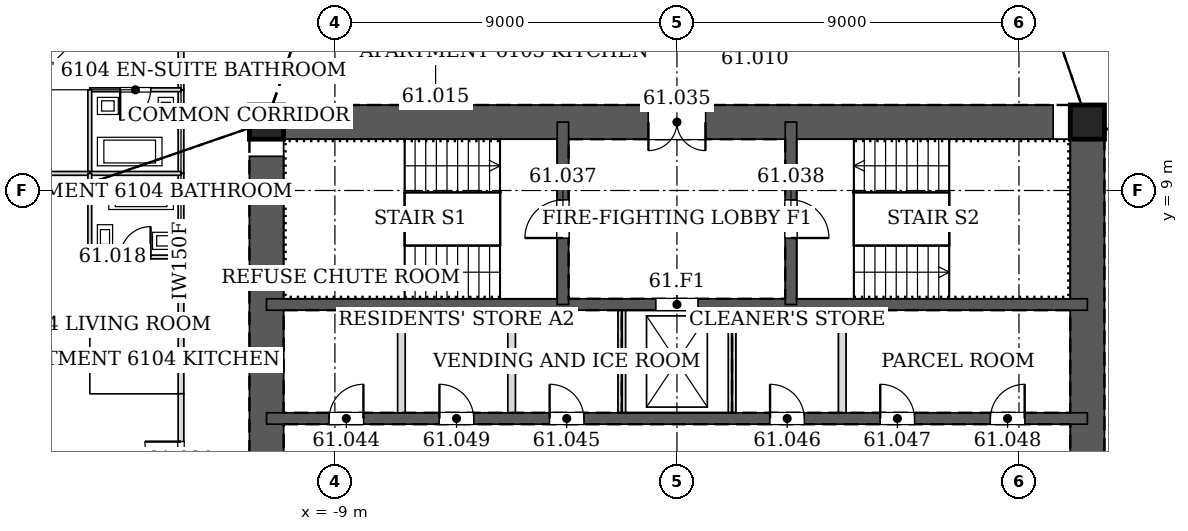
"""IFC4 building model, lengths in metres.
Left out: names, types, materials, properties, quantities, classifications, styles, units other than length and angle.
Written with IfcOpenShell. Run it as: python <this file> out.ifc"""

import sys

from ifc_helpers import new_model, si_unit, direction, frame, frame_2d, origin, origin_2d, place, context, subcontext, project, spatial, rectangle, hollow_rectangle, extrude, element, fill, save


model = new_model("IFC4")
c1 = context("Model", 3, precision=1e-05, world=origin(), true_north=direction((0.0, 1.0)))
c2 = subcontext(c1, "Body", "Model", "MODEL_VIEW")
j1 = project(units=[si_unit("LENGTHUNIT", "METRE"), si_unit("PLANEANGLEUNIT", "RADIAN")], contexts=[c1])
p1 = place(None, origin())
s1 = spatial("IfcSite", under=j1, at=p1, CompositionType="ELEMENT")
p2 = place(p1, origin())
s2 = spatial("IfcBuilding", under=s1, at=p2, CompositionType="ELEMENT")
p3 = place(p2, frame((0.0, 0.0, 255.0)))
s3 = spatial("IfcBuildingStorey", under=s2, at=p3, CompositionType="ELEMENT", Elevation=255.0)
for number, where, z_axis, x_axis in (
    (1, (10.8, 10.8, 0.0), (0.0, 0.0, 1.0), (1.0, 0.0, 0.0)),
    (2, (-10.8, 10.8, 0.0), (0.0, 0.0, 1.0), (1.0, 0.0, 0.0)),
):
    element("IfcColumn", number, at=place(p3, frame(where, z_axis=z_axis, x_axis=x_axis)), inside=s3, PredefinedType="COLUMN", context=c2, shape_type="SweptSolid", body=[
        extrude(hollow_rectangle(XDim=0.9, YDim=0.9, WallThickness=0.04, at=origin_2d()), origin(), (0.0, 0.0, 1.0), 3.4),
    ])
p4 = place(p3, frame((10.8, -10.8, 0.0), z_axis=(0.0, 0.0, 1.0), x_axis=(0.0, 1.0, 0.0)))
e3 = element("IfcWall", 3, at=p4, inside=s3, PredefinedType="SOLIDWALL", context=c2, shape_type="SweptSolid", body=[
    extrude(rectangle(XDim=21.6, YDim=0.9, at=frame_2d((10.8, 0.0))), origin(), (0.0, 0.0, 1.0), 3.4),
])
p5 = place(p4, frame((11.7, 0.0, 0.0)))
e4 = element("IfcOpeningElement", 4, at=p5, cuts=e3, PredefinedType="OPENING", context=c2, shape_type="SweptSolid", body=[
    extrude(rectangle(XDim=1.2, YDim=2.1, at=frame_2d((0.6, 1.05))), frame((0.0, 0.46, 0.0), z_axis=(0.0, -1.0, 0.0), x_axis=(1.0, 0.0, 0.0)), (0.0, 0.0, 1.0), 0.92),
])
p6 = place(p4, frame((8.7, 0.0, 0.0)))
e5 = element("IfcOpeningElement", 5, at=p6, cuts=e3, PredefinedType="OPENING", context=c2, shape_type="SweptSolid", body=[
    extrude(rectangle(XDim=1.2, YDim=2.1, at=frame_2d((0.6, 1.05))), frame((0.0, 0.46, 0.0), z_axis=(0.0, -1.0, 0.0), x_axis=(1.0, 0.0, 0.0)), (0.0, 0.0, 1.0), 0.92),
])
p7 = place(p3, frame((10.8, 10.8, 0.0), z_axis=(0.0, 0.0, 1.0), x_axis=(-1.0, 0.0, 0.0)))
e6 = element("IfcWall", 6, at=p7, inside=s3, PredefinedType="SOLIDWALL", context=c2, shape_type="SweptSolid", body=[
    extrude(rectangle(XDim=21.6, YDim=0.9, at=frame_2d((10.8, 0.0))), origin(), (0.0, 0.0, 1.0), 3.4),
])
p8 = place(p7, frame((10.05, 0.0, 0.0)))
e7 = element("IfcOpeningElement", 7, at=p8, cuts=e6, PredefinedType="OPENING", context=c2, shape_type="SweptSolid", body=[
    extrude(rectangle(XDim=1.5, YDim=2.1, at=frame_2d((0.75, 1.05))), frame((0.0, 0.46, 0.0), z_axis=(0.0, -1.0, 0.0), x_axis=(1.0, 0.0, 0.0)), (0.0, 0.0, 1.0), 0.92),
])
p9 = place(p3, frame((-10.8, 10.8, 0.0), z_axis=(0.0, 0.0, 1.0), x_axis=(0.0, -1.0, 0.0)))
e8 = element("IfcWall", 8, at=p9, inside=s3, PredefinedType="SOLIDWALL", context=c2, shape_type="SweptSolid", body=[
    extrude(rectangle(XDim=21.6, YDim=0.9, at=frame_2d((10.8, 0.0))), origin(), (0.0, 0.0, 1.0), 3.4),
])
p10 = place(p9, frame((8.7, 0.0, 0.0)))
e9 = element("IfcOpeningElement", 9, at=p10, cuts=e8, PredefinedType="OPENING", context=c2, shape_type="SweptSolid", body=[
    extrude(rectangle(XDim=1.2, YDim=2.1, at=frame_2d((0.6, 1.05))), frame((0.0, 0.46, 0.0), z_axis=(0.0, -1.0, 0.0), x_axis=(1.0, 0.0, 0.0)), (0.0, 0.0, 1.0), 0.92),
])
p11 = place(p9, frame((11.7, 0.0, 0.0)))
e10 = element("IfcOpeningElement", 10, at=p11, cuts=e8, PredefinedType="OPENING", context=c2, shape_type="SweptSolid", body=[
    extrude(rectangle(XDim=1.2, YDim=2.1, at=frame_2d((0.6, 1.05))), frame((0.0, 0.46, 0.0), z_axis=(0.0, -1.0, 0.0), x_axis=(1.0, 0.0, 0.0)), (0.0, 0.0, 1.0), 0.92),
])
p12 = place(p3, frame((-10.8, 3.0, 0.0), z_axis=(0.0, 0.0, 1.0), x_axis=(1.0, 0.0, 0.0)))
e11 = element("IfcWall", 11, at=p12, inside=s3, PredefinedType="SOLIDWALL", context=c2, shape_type="SweptSolid", body=[
    extrude(rectangle(XDim=21.6, YDim=0.3, at=frame_2d((10.8, 0.0))), origin(), (0.0, 0.0, 1.0), 3.4),
])
p13 = place(p12, frame((1.65, 0.0, 0.0)))
e12 = element("IfcOpeningElement", 12, at=p13, cuts=e11, PredefinedType="OPENING", context=c2, shape_type="SweptSolid", body=[
    extrude(rectangle(XDim=0.9, YDim=2.1, at=frame_2d((0.45, 1.05))), frame((0.0, 0.16, 0.0), z_axis=(0.0, -1.0, 0.0), x_axis=(1.0, 0.0, 0.0)), (0.0, 0.0, 1.0), 0.32),
])
p14 = place(p12, frame((7.45, 0.0, 0.0)))
e13 = element("IfcOpeningElement", 13, at=p14, cuts=e11, PredefinedType="OPENING", context=c2, shape_type="SweptSolid", body=[
    extrude(rectangle(XDim=0.9, YDim=2.1, at=frame_2d((0.45, 1.05))), frame((0.0, 0.16, 0.0), z_axis=(0.0, -1.0, 0.0), x_axis=(1.0, 0.0, 0.0)), (0.0, 0.0, 1.0), 0.32),
])
p15 = place(p12, frame((13.25, 0.0, 0.0)))
e14 = element("IfcOpeningElement", 14, at=p15, cuts=e11, PredefinedType="OPENING", context=c2, shape_type="SweptSolid", body=[
    extrude(rectangle(XDim=0.9, YDim=2.1, at=frame_2d((0.45, 1.05))), frame((0.0, 0.16, 0.0), z_axis=(0.0, -1.0, 0.0), x_axis=(1.0, 0.0, 0.0)), (0.0, 0.0, 1.0), 0.32),
])
p16 = place(p12, frame((16.15, 0.0, 0.0)))
e15 = element("IfcOpeningElement", 15, at=p16, cuts=e11, PredefinedType="OPENING", context=c2, shape_type="SweptSolid", body=[
    extrude(rectangle(XDim=0.9, YDim=2.1, at=frame_2d((0.45, 1.05))), frame((0.0, 0.16, 0.0), z_axis=(0.0, -1.0, 0.0), x_axis=(1.0, 0.0, 0.0)), (0.0, 0.0, 1.0), 0.32),
])
p17 = place(p12, frame((19.05, 0.0, 0.0)))
e16 = element("IfcOpeningElement", 16, at=p17, cuts=e11, PredefinedType="OPENING", context=c2, shape_type="SweptSolid", body=[
    extrude(rectangle(XDim=0.9, YDim=2.1, at=frame_2d((0.45, 1.05))), frame((0.0, 0.16, 0.0), z_axis=(0.0, -1.0, 0.0), x_axis=(1.0, 0.0, 0.0)), (0.0, 0.0, 1.0), 0.32),
])
p18 = place(p12, frame((4.55, 0.0, 0.0)))
e17 = element("IfcOpeningElement", 17, at=p18, cuts=e11, PredefinedType="OPENING", context=c2, shape_type="SweptSolid", body=[
    extrude(rectangle(XDim=0.9, YDim=2.1, at=frame_2d((0.45, 1.05))), frame((0.0, 0.16, 0.0), z_axis=(0.0, -1.0, 0.0), x_axis=(1.0, 0.0, 0.0)), (0.0, 0.0, 1.0), 0.32),
])
p19 = place(p3, frame((-10.8, 6.0, 0.0), z_axis=(0.0, 0.0, 1.0), x_axis=(1.0, 0.0, 0.0)))
e18 = element("IfcWall", 18, at=p19, inside=s3, PredefinedType="SOLIDWALL", context=c2, shape_type="SweptSolid", body=[
    extrude(rectangle(XDim=21.6, YDim=0.3, at=frame_2d((10.8, 0.0))), origin(), (0.0, 0.0, 1.0), 3.4),
])
p20 = place(p19, frame((10.25, 0.0, 0.0)))
e19 = element("IfcOpeningElement", 19, at=p20, cuts=e18, PredefinedType="OPENING", context=c2, shape_type="SweptSolid", body=[
    extrude(rectangle(XDim=1.1, YDim=2.1, at=frame_2d((0.55, 1.05))), frame((0.0, 0.16, 0.0), z_axis=(0.0, -1.0, 0.0), x_axis=(1.0, 0.0, 0.0)), (0.0, 0.0, 1.0), 0.32),
])
p21 = place(p3, frame((-3.0, 6.0, 0.0), z_axis=(0.0, 0.0, 1.0), x_axis=(0.0, 1.0, 0.0)))
e20 = element("IfcWall", 20, at=p21, inside=s3, PredefinedType="SOLIDWALL", context=c2, shape_type="SweptSolid", body=[
    extrude(rectangle(XDim=4.8, YDim=0.3, at=frame_2d((2.4, 0.0))), origin(), (0.0, 0.0, 1.0), 3.4),
])
p22 = place(p21, frame((1.75, 0.0, 0.0)))
e21 = element("IfcOpeningElement", 21, at=p22, cuts=e20, PredefinedType="OPENING", context=c2, shape_type="SweptSolid", body=[
    extrude(rectangle(XDim=1.0, YDim=2.1, at=frame_2d((0.5, 1.05))), frame((0.0, 0.16, 0.0), z_axis=(0.0, -1.0, 0.0), x_axis=(1.0, 0.0, 0.0)), (0.0, 0.0, 1.0), 0.32),
])
p23 = place(p3, frame((3.0, 6.0, 0.0), z_axis=(0.0, 0.0, 1.0), x_axis=(0.0, 1.0, 0.0)))
e22 = element("IfcWall", 22, at=p23, inside=s3, PredefinedType="SOLIDWALL", context=c2, shape_type="SweptSolid", body=[
    extrude(rectangle(XDim=4.8, YDim=0.3, at=frame_2d((2.4, 0.0))), origin(), (0.0, 0.0, 1.0), 3.4),
])
p24 = place(p23, frame((1.75, 0.0, 0.0)))
e23 = element("IfcOpeningElement", 23, at=p24, cuts=e22, PredefinedType="OPENING", context=c2, shape_type="SweptSolid", body=[
    extrude(rectangle(XDim=1.0, YDim=2.1, at=frame_2d((0.5, 1.05))), frame((0.0, 0.16, 0.0), z_axis=(0.0, -1.0, 0.0), x_axis=(1.0, 0.0, 0.0)), (0.0, 0.0, 1.0), 0.32),
])
p25 = place(p3, frame((-13.05, 11.651, 0.0), z_axis=(0.0, 0.0, 1.0), x_axis=(0.0, -1.0, 0.0)))
e24 = element("IfcWall", 24, at=p25, inside=s3, PredefinedType="PARTITIONING", context=c2, shape_type="SweptSolid", body=[
    extrude(rectangle(XDim=2.202, YDim=0.15, at=frame_2d((1.101, 0.0))), origin(), (0.0, 0.0, 1.0), 2.349),
])
p26 = place(p3, frame((-13.05, 13.05, 0.0), z_axis=(0.0, 0.0, 1.0), x_axis=(0.0, -1.0, 0.0)))
e25 = element("IfcWall", 25, at=p26, inside=s3, PredefinedType="PARTITIONING", context=c2, shape_type="SweptSolid", body=[
    extrude(rectangle(XDim=1.401, YDim=0.15, at=frame_2d((0.701, 0.0))), origin(), (0.0, 0.0, 1.0), 2.656),
])
p27 = place(p3, frame((-13.05, 9.451, 0.0), z_axis=(0.0, 0.0, 1.0), x_axis=(0.0, -1.0, 0.0)))
e26 = element("IfcWall", 26, at=p27, inside=s3, PredefinedType="PARTITIONING", context=c2, shape_type="SweptSolid", body=[
    extrude(rectangle(XDim=2.202, YDim=0.15, at=frame_2d((1.101, 0.0))), origin(), (0.0, 0.0, 1.0), 2.662),
])
p28 = place(p3, frame((-13.05, 5.451, 0.0), z_axis=(0.0, 0.0, 1.0), x_axis=(0.0, -1.0, 0.0)))
e27 = element("IfcWall", 27, at=p28, inside=s3, PredefinedType="PARTITIONING", context=c2, shape_type="SweptSolid", body=[
    extrude(rectangle(XDim=1.802, YDim=0.15, at=frame_2d((0.901, 0.0))), origin(), (0.0, 0.0, 1.0), 2.662),
])
p29 = place(p3, frame((-13.05, 3.651, 0.0), z_axis=(0.0, 0.0, 1.0), x_axis=(0.0, -1.0, 0.0)))
e28 = element("IfcWall", 28, at=p29, inside=s3, PredefinedType="PARTITIONING", context=c2, shape_type="SweptSolid", body=[
    extrude(rectangle(XDim=3.469, YDim=0.15, at=frame_2d((1.734, 0.0))), origin(), (0.0, 0.0, 1.0), 2.662),
])
p30 = place(p29, frame((1.259, 0.0, 0.0)))
e29 = element("IfcOpeningElement", 29, at=p30, cuts=e28, PredefinedType="OPENING", context=c2, shape_type="SweptSolid", body=[
    extrude(rectangle(XDim=0.95, YDim=2.1, at=frame_2d((0.475, 1.05))), frame((0.0, 0.085, 0.0), z_axis=(0.0, -1.0, 0.0), x_axis=(1.0, 0.0, 0.0)), (0.0, 0.0, 1.0), 0.17),
])
p31 = place(p3, frame((-13.05, 7.251, 0.0), z_axis=(0.0, 0.0, 1.0), x_axis=(0.0, -1.0, 0.0)))
e30 = element("IfcWall", 30, at=p31, inside=s3, PredefinedType="PARTITIONING", context=c2, shape_type="SweptSolid", body=[
    extrude(rectangle(XDim=1.802, YDim=0.15, at=frame_2d((0.901, 0.0))), origin(), (0.0, 0.0, 1.0), 2.662),
])
p32 = place(p3, frame((-13.05, 11.65, 0.0), z_axis=(0.0, 0.0, 1.0), x_axis=(-1.0, 0.0, 0.0)))
e31 = element("IfcWall", 31, at=p32, inside=s3, PredefinedType="PARTITIONING", context=c2, shape_type="SweptSolid", body=[
    extrude(rectangle(XDim=2.4, YDim=0.1, at=frame_2d((1.2, 0.0))), origin(), (0.0, 0.0, 1.0), 2.786),
])
p33 = place(p32, frame((0.8, 0.0, 0.0)))
e32 = element("IfcOpeningElement", 32, at=p33, cuts=e31, PredefinedType="OPENING", context=c2, shape_type="SweptSolid", body=[
    extrude(rectangle(XDim=0.8, YDim=2.1, at=frame_2d((0.4, 1.05))), frame((0.0, 0.06, 0.0), z_axis=(0.0, -1.0, 0.0), x_axis=(1.0, 0.0, 0.0)), (0.0, 0.0, 1.0), 0.12),
])
p34 = place(p3, frame((-15.45, 11.65, 0.0), z_axis=(0.0, 0.0, 1.0), x_axis=(0.0, -1.0, 0.0)))
e33 = element("IfcWall", 33, at=p34, inside=s3, PredefinedType="PARTITIONING", context=c2, shape_type="SweptSolid", body=[
    extrude(rectangle(XDim=2.2, YDim=0.1, at=frame_2d((1.1, 0.0))), origin(), (0.0, 0.0, 1.0), 2.786),
])
p35 = place(p3, frame((-15.45, 9.45, 0.0), z_axis=(0.0, 0.0, 1.0), x_axis=(1.0, 0.0, 0.0)))
e34 = element("IfcWall", 34, at=p35, inside=s3, PredefinedType="PARTITIONING", context=c2, shape_type="SweptSolid", body=[
    extrude(rectangle(XDim=2.4, YDim=0.1, at=frame_2d((1.2, 0.0))), origin(), (0.0, 0.0, 1.0), 2.349),
])
p36 = place(p3, frame((-19.945, 9.45, 0.0), z_axis=(0.0, 0.0, 1.0), x_axis=(1.0, 0.0, 0.0)))
e35 = element("IfcWall", 35, at=p36, inside=s3, PredefinedType="PARTITIONING", context=c2, shape_type="SweptSolid", body=[
    extrude(rectangle(XDim=4.495, YDim=0.1, at=frame_2d((2.248, 0.0))), origin(), (0.0, 0.0, 1.0), 2.74),
])
p37 = place(p36, frame((1.626, 0.0, 0.0)))
e36 = element("IfcOpeningElement", 36, at=p37, cuts=e35, PredefinedType="OPENING", context=c2, shape_type="SweptSolid", body=[
    extrude(rectangle(XDim=0.85, YDim=2.1, at=frame_2d((0.425, 1.05))), frame((0.0, 0.06, 0.0), z_axis=(0.0, -1.0, 0.0), x_axis=(1.0, 0.0, 0.0)), (0.0, 0.0, 1.0), 0.12),
])
p38 = place(p3, frame((-15.45, 9.45, 0.0), z_axis=(0.0, 0.0, 1.0), x_axis=(0.0, -1.0, 0.0)))
e37 = element("IfcWall", 37, at=p38, inside=s3, PredefinedType="PARTITIONING", context=c2, shape_type="SweptSolid", body=[
    extrude(rectangle(XDim=2.2, YDim=0.1, at=frame_2d((1.1, 0.0))), origin(), (0.0, 0.0, 1.0), 2.349),
])
p39 = place(p3, frame((-15.45, 7.25, 0.0), z_axis=(0.0, 0.0, 1.0), x_axis=(1.0, 0.0, 0.0)))
e38 = element("IfcWall", 38, at=p39, inside=s3, PredefinedType="PARTITIONING", context=c2, shape_type="SweptSolid", body=[
    extrude(rectangle(XDim=2.4, YDim=0.1, at=frame_2d((1.2, 0.0))), origin(), (0.0, 0.0, 1.0), 2.662),
])
p40 = place(p39, frame((0.8, 0.0, 0.0)))
e39 = element("IfcOpeningElement", 39, at=p40, cuts=e38, PredefinedType="OPENING", context=c2, shape_type="SweptSolid", body=[
    extrude(rectangle(XDim=0.8, YDim=2.1, at=frame_2d((0.4, 1.05))), frame((0.0, 0.06, 0.0), z_axis=(0.0, -1.0, 0.0), x_axis=(1.0, 0.0, 0.0)), (0.0, 0.0, 1.0), 0.12),
])
for number, where, z_axis, x_axis in (
    (40, (-7.25, 3.15, 0.0), (0.0, 0.0, 1.0), (0.0, 1.0, 0.0)),
    (41, (-4.35, 3.15, 0.0), (0.0, 0.0, 1.0), (0.0, 1.0, 0.0)),
    (42, (-1.45, 3.15, 0.0), (0.0, 0.0, 1.0), (0.0, 1.0, 0.0)),
    (43, (1.45, 3.15, 0.0), (0.0, 0.0, 1.0), (0.0, 1.0, 0.0)),
    (44, (4.35, 3.15, 0.0), (0.0, 0.0, 1.0), (0.0, 1.0, 0.0)),
):
    element("IfcWall", number, at=place(p3, frame(where, z_axis=z_axis, x_axis=x_axis)), inside=s3, PredefinedType="PARTITIONING", context=c2, shape_type="SweptSolid", body=[
        extrude(rectangle(XDim=2.7, YDim=0.2, at=frame_2d((1.35, 0.0))), origin(), (0.0, 0.0, 1.0), 3.2),
    ])
p41 = place(p33, origin())
e45 = element("IfcDoor", 45, at=p41, inside=s3, OperationType="SINGLE_SWING_RIGHT", PredefinedType="DOOR", context=c2, shape_type="SweptSolid", body=[
    extrude(rectangle(XDim=0.8, YDim=2.1, at=frame_2d((0.4, 1.05))), frame((0.0, 0.025, 0.0), z_axis=(0.0, -1.0, 0.0), x_axis=(1.0, 0.0, 0.0)), (0.0, 0.0, 1.0), 0.05),
])
fill(e32, e45)
p42 = place(p40, origin())
e46 = element("IfcDoor", 46, at=p42, inside=s3, OperationType="SINGLE_SWING_RIGHT", PredefinedType="DOOR", context=c2, shape_type="SweptSolid", body=[
    extrude(rectangle(XDim=0.8, YDim=2.1, at=frame_2d((0.4, 1.05))), frame((0.0, 0.025, 0.0), z_axis=(0.0, -1.0, 0.0), x_axis=(1.0, 0.0, 0.0)), (0.0, 0.0, 1.0), 0.05),
])
fill(e39, e46)
p43 = place(p30, frame((0.95, 0.0, 0.0), z_axis=(0.0, 0.0, 1.0), x_axis=(-1.0, 0.0, 0.0)))
e47 = element("IfcDoor", 47, at=p43, inside=s3, OperationType="SINGLE_SWING_RIGHT", PredefinedType="DOOR", context=c2, shape_type="SweptSolid", body=[
    extrude(rectangle(XDim=0.95, YDim=2.1, at=frame_2d((0.475, 1.05))), frame((0.0, 0.025, 0.0), z_axis=(0.0, -1.0, 0.0), x_axis=(1.0, 0.0, 0.0)), (0.0, 0.0, 1.0), 0.05),
])
fill(e29, e47)
p44 = place(p8, origin())
e48 = element("IfcDoor", 48, at=p44, inside=s3, OperationType="DOUBLE_DOOR_SINGLE_SWING", PredefinedType="DOOR", context=c2, shape_type="SweptSolid", body=[
    extrude(rectangle(XDim=1.5, YDim=2.1, at=frame_2d((0.75, 1.05))), frame((0.0, 0.025, 0.0), z_axis=(0.0, -1.0, 0.0), x_axis=(1.0, 0.0, 0.0)), (0.0, 0.0, 1.0), 0.05),
])
fill(e7, e48)
p45 = place(p22, origin())
e49 = element("IfcDoor", 49, at=p45, inside=s3, OperationType="SINGLE_SWING_LEFT", PredefinedType="DOOR", context=c2, shape_type="SweptSolid", body=[
    extrude(rectangle(XDim=1.0, YDim=2.1, at=frame_2d((0.5, 1.05))), frame((0.0, 0.025, 0.0), z_axis=(0.0, -1.0, 0.0), x_axis=(1.0, 0.0, 0.0)), (0.0, 0.0, 1.0), 0.05),
])
fill(e21, e49)
p46 = place(p24, frame((1.0, 0.0, 0.0), z_axis=(0.0, 0.0, 1.0), x_axis=(-1.0, 0.0, 0.0)))
e50 = element("IfcDoor", 50, at=p46, inside=s3, OperationType="SINGLE_SWING_RIGHT", PredefinedType="DOOR", context=c2, shape_type="SweptSolid", body=[
    extrude(rectangle(XDim=1.0, YDim=2.1, at=frame_2d((0.5, 1.05))), frame((0.0, 0.025, 0.0), z_axis=(0.0, -1.0, 0.0), x_axis=(1.0, 0.0, 0.0)), (0.0, 0.0, 1.0), 0.05),
])
fill(e23, e50)
p47 = place(p13, origin())
e51 = element("IfcDoor", 51, at=p47, inside=s3, OperationType="SINGLE_SWING_RIGHT", PredefinedType="DOOR", context=c2, shape_type="SweptSolid", body=[
    extrude(rectangle(XDim=0.9, YDim=2.1, at=frame_2d((0.45, 1.05))), frame((0.0, 0.025, 0.0), z_axis=(0.0, -1.0, 0.0), x_axis=(1.0, 0.0, 0.0)), (0.0, 0.0, 1.0), 0.05),
])
fill(e12, e51)
p48 = place(p14, origin())
e52 = element("IfcDoor", 52, at=p48, inside=s3, OperationType="SINGLE_SWING_LEFT", PredefinedType="DOOR", context=c2, shape_type="SweptSolid", body=[
    extrude(rectangle(XDim=0.9, YDim=2.1, at=frame_2d((0.45, 1.05))), frame((0.0, 0.025, 0.0), z_axis=(0.0, -1.0, 0.0), x_axis=(1.0, 0.0, 0.0)), (0.0, 0.0, 1.0), 0.05),
])
fill(e13, e52)
p49 = place(p15, origin())
e53 = element("IfcDoor", 53, at=p49, inside=s3, OperationType="SINGLE_SWING_LEFT", PredefinedType="DOOR", context=c2, shape_type="SweptSolid", body=[
    extrude(rectangle(XDim=0.9, YDim=2.1, at=frame_2d((0.45, 1.05))), frame((0.0, 0.025, 0.0), z_axis=(0.0, -1.0, 0.0), x_axis=(1.0, 0.0, 0.0)), (0.0, 0.0, 1.0), 0.05),
])
fill(e14, e53)
p50 = place(p16, origin())
e54 = element("IfcDoor", 54, at=p50, inside=s3, OperationType="SINGLE_SWING_LEFT", PredefinedType="DOOR", context=c2, shape_type="SweptSolid", body=[
    extrude(rectangle(XDim=0.9, YDim=2.1, at=frame_2d((0.45, 1.05))), frame((0.0, 0.025, 0.0), z_axis=(0.0, -1.0, 0.0), x_axis=(1.0, 0.0, 0.0)), (0.0, 0.0, 1.0), 0.05),
])
fill(e15, e54)
p51 = place(p17, origin())
e55 = element("IfcDoor", 55, at=p51, inside=s3, OperationType="SINGLE_SWING_RIGHT", PredefinedType="DOOR", context=c2, shape_type="SweptSolid", body=[
    extrude(rectangle(XDim=0.9, YDim=2.1, at=frame_2d((0.45, 1.05))), frame((0.0, 0.025, 0.0), z_axis=(0.0, -1.0, 0.0), x_axis=(1.0, 0.0, 0.0)), (0.0, 0.0, 1.0), 0.05),
])
fill(e16, e55)
p52 = place(p18, origin())
e56 = element("IfcDoor", 56, at=p52, inside=s3, OperationType="SINGLE_SWING_LEFT", PredefinedType="DOOR", context=c2, shape_type="SweptSolid", body=[
    extrude(rectangle(XDim=0.9, YDim=2.1, at=frame_2d((0.45, 1.05))), frame((0.0, 0.025, 0.0), z_axis=(0.0, -1.0, 0.0), x_axis=(1.0, 0.0, 0.0)), (0.0, 0.0, 1.0), 0.05),
])
fill(e17, e56)
p53 = place(p20, origin())
e57 = element("IfcDoor", 57, at=p53, inside=s3, OperationType="DOUBLE_DOOR_SLIDING", PredefinedType="DOOR", context=c2, shape_type="SweptSolid", body=[
    extrude(rectangle(XDim=1.1, YDim=2.1, at=frame_2d((0.55, 1.05))), frame((0.0, 0.025, 0.0), z_axis=(0.0, -1.0, 0.0), x_axis=(1.0, 0.0, 0.0)), (0.0, 0.0, 1.0), 0.05),
])
fill(e19, e57)
save(model, sys.argv[1])
